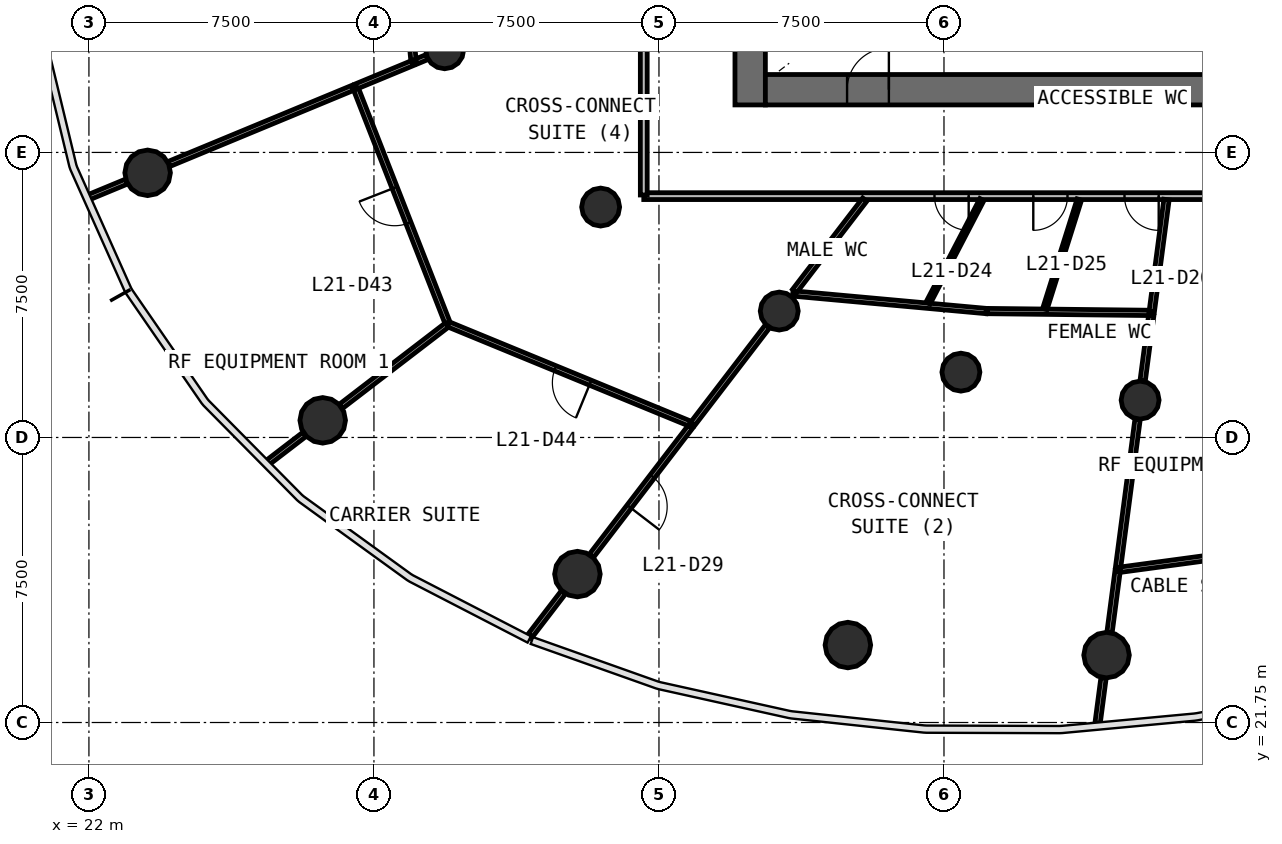
"""IFC4 building model, lengths in metres.
Left out: names, types, materials, properties, quantities, classifications, styles, units other than length and angle.
Written with IfcOpenShell. Run it as: python <this file> out.ifc"""

import sys

from ifc_helpers import new_model, si_unit, direction, frame, frame_2d, origin, origin_2d, place, context, subcontext, project, spatial, rectangle, circle, extrude, source, transform, mapped, element, fill, save


model = new_model("IFC4")
c1 = context("Model", 3, precision=1e-05, world=origin(), true_north=direction((0.0, 1.0)))
c2 = subcontext(c1, "Body", "Model", "MODEL_VIEW")
j1 = project(units=[si_unit("LENGTHUNIT", "METRE"), si_unit("PLANEANGLEUNIT", "RADIAN")], contexts=[c1])
p1 = place(None, origin())
s1 = spatial("IfcSite", under=j1, at=p1, CompositionType="ELEMENT")
p2 = place(p1, origin())
s2 = spatial("IfcBuilding", under=s1, at=p2, CompositionType="ELEMENT")
p3 = place(p2, frame((0.0, 0.0, 92.1)))
s3 = spatial("IfcBuildingStorey", under=s2, at=p3, CompositionType="ELEMENT", Elevation=92.1)
p4 = place(p3, frame((39.4, 58.0, 0.0), z_axis=(0.0, 0.0, 1.0), x_axis=(0.0, -1.0, 0.0)))
e1 = element("IfcWall", 1, at=p4, inside=s3, PredefinedType="SHEAR", context=c2, shape_type="SweptSolid", body=[
    extrude(rectangle(XDim=20.0, YDim=0.8, at=frame_2d((10.0, 0.0))), origin(), (0.0, 0.0, 1.0), 4.1),
])
p5 = place(p4, frame((9.1, 0.0, 0.0)))
e2 = element("IfcOpeningElement", 2, at=p5, cuts=e1, PredefinedType="OPENING", context=c2, shape_type="SweptSolid", body=[
    extrude(rectangle(XDim=1.8, YDim=2.1, at=frame_2d((0.9, 1.05))), frame((0.0, 0.41, 0.0), z_axis=(0.0, -1.0, 0.0), x_axis=(1.0, 0.0, 0.0)), (0.0, 0.0, 1.0), 0.82),
])
p6 = place(p3, frame((39.8, 38.4, 0.0), z_axis=(0.0, 0.0, 1.0), x_axis=(1.0, 0.0, 0.0)))
e3 = element("IfcWall", 3, at=p6, inside=s3, PredefinedType="SHEAR", context=c2, shape_type="SweptSolid", body=[
    extrude(rectangle(XDim=24.4, YDim=0.8, at=frame_2d((12.2, 0.0))), origin(), (0.0, 0.0, 1.0), 4.1),
])
p7 = place(p6, frame((21.65, 0.0, 0.0)))
e4 = element("IfcOpeningElement", 4, at=p7, cuts=e3, PredefinedType="OPENING", context=c2, shape_type="SweptSolid", body=[
    extrude(rectangle(XDim=1.1, YDim=2.1, at=frame_2d((0.55, 1.05))), frame((0.0, 0.41, 0.0), z_axis=(0.0, -1.0, 0.0), x_axis=(1.0, 0.0, 0.0)), (0.0, 0.0, 1.0), 0.82),
])
p8 = place(p6, frame((2.15, 0.0, 0.0)))
e5 = element("IfcOpeningElement", 5, at=p8, cuts=e3, PredefinedType="OPENING", context=c2, shape_type="SweptSolid", body=[
    extrude(rectangle(XDim=1.1, YDim=2.1, at=frame_2d((0.55, 1.05))), frame((0.0, 0.41, 0.0), z_axis=(0.0, -1.0, 0.0), x_axis=(1.0, 0.0, 0.0)), (0.0, 0.0, 1.0), 0.82),
])
m1 = source(origin(), c2, "Body", "SweptSolid", [
    extrude(circle(Radius=0.6, at=origin_2d()), origin(), (0.0, 0.0, 1.0), 4.1),
])
for number, where, z_axis, x_axis in (
    (6, (23.544, 36.213, 0.0), (0.0, 0.0, 1.0), (1.0, 0.0, 0.0)),
    (7, (28.152, 29.701, 0.0), (0.0, 0.0, 1.0), (1.0, 0.0, 0.0)),
    (8, (34.854, 25.655, 0.0), (0.0, 0.0, 1.0), (1.0, 0.0, 0.0)),
    (9, (41.971, 23.788, 0.0), (0.0, 0.0, 1.0), (1.0, 0.0, 0.0)),
    (10, (48.778, 23.523, 0.0), (0.0, 0.0, 1.0), (1.0, 0.0, 0.0)),
):
    element("IfcColumn", number, at=place(p3, frame(where, z_axis=z_axis, x_axis=x_axis)), inside=s3, PredefinedType="COLUMN", context=c2, shape_type="MappedRepresentation", body=[
        mapped(m1, transform((0.0, 0.0, 0.0), scale=1.0)),
    ])
m2 = source(origin(), c2, "Body", "SweptSolid", [
    extrude(circle(Radius=0.5, at=origin_2d()), origin(), (0.0, 0.0, 1.0), 4.1),
])
for number, where, z_axis, x_axis in (
    (11, (31.361, 39.451, 0.0), (0.0, 0.0, 1.0), (1.0, 0.0, 0.0)),
    (12, (35.465, 35.312, 0.0), (0.0, 0.0, 1.0), (1.0, 0.0, 0.0)),
    (13, (40.165, 32.576, 0.0), (0.0, 0.0, 1.0), (1.0, 0.0, 0.0)),
    (14, (44.945, 30.969, 0.0), (0.0, 0.0, 1.0), (1.0, 0.0, 0.0)),
    (15, (49.661, 30.233, 0.0), (0.0, 0.0, 1.0), (1.0, 0.0, 0.0)),
):
    element("IfcColumn", number, at=place(p3, frame(where, z_axis=z_axis, x_axis=x_axis)), inside=s3, PredefinedType="COLUMN", context=c2, shape_type="MappedRepresentation", body=[
        mapped(m2, transform((0.0, 0.0, 0.0), scale=1.0)),
    ])
p9 = place(p3, frame((67.4, 35.6, 0.0), z_axis=(0.0, 0.0, 1.0), x_axis=(-1.0, 0.0, 0.0)))
e16 = element("IfcWall", 16, at=p9, inside=s3, PredefinedType="PARTITIONING", context=c2, shape_type="SweptSolid", body=[
    extrude(rectangle(XDim=30.8, YDim=0.18, at=frame_2d((15.4, 0.0))), origin(), (0.0, 0.0, 1.0), 2.9),
])
p10 = place(p9, frame((22.25, 0.0, 0.0)))
e17 = element("IfcOpeningElement", 17, at=p10, cuts=e16, PredefinedType="OPENING", context=c2, shape_type="SweptSolid", body=[
    extrude(rectangle(XDim=0.9, YDim=2.1, at=frame_2d((0.45, 1.05))), frame((0.0, 0.1, 0.0), z_axis=(0.0, -1.0, 0.0), x_axis=(1.0, 0.0, 0.0)), (0.0, 0.0, 1.0), 0.2),
])
p11 = place(p9, frame((19.65, 0.0, 0.0)))
e18 = element("IfcOpeningElement", 18, at=p11, cuts=e16, PredefinedType="OPENING", context=c2, shape_type="SweptSolid", body=[
    extrude(rectangle(XDim=0.9, YDim=2.1, at=frame_2d((0.45, 1.05))), frame((0.0, 0.1, 0.0), z_axis=(0.0, -1.0, 0.0), x_axis=(1.0, 0.0, 0.0)), (0.0, 0.0, 1.0), 0.2),
])
p12 = place(p9, frame((17.25, 0.0, 0.0)))
e19 = element("IfcOpeningElement", 19, at=p12, cuts=e16, PredefinedType="OPENING", context=c2, shape_type="SweptSolid", body=[
    extrude(rectangle(XDim=0.9, YDim=2.1, at=frame_2d((0.45, 1.05))), frame((0.0, 0.1, 0.0), z_axis=(0.0, -1.0, 0.0), x_axis=(1.0, 0.0, 0.0)), (0.0, 0.0, 1.0), 0.2),
])
p13 = place(p9, frame((14.95, 0.0, 0.0)))
e20 = element("IfcOpeningElement", 20, at=p13, cuts=e16, PredefinedType="OPENING", context=c2, shape_type="SweptSolid", body=[
    extrude(rectangle(XDim=1.0, YDim=2.1, at=frame_2d((0.5, 1.05))), frame((0.0, 0.1, 0.0), z_axis=(0.0, -1.0, 0.0), x_axis=(1.0, 0.0, 0.0)), (0.0, 0.0, 1.0), 0.2),
])
p14 = place(p9, frame((4.35, 0.0, 0.0)))
e21 = element("IfcOpeningElement", 21, at=p14, cuts=e16, PredefinedType="OPENING", context=c2, shape_type="SweptSolid", body=[
    extrude(rectangle(XDim=1.0, YDim=2.1, at=frame_2d((0.5, 1.05))), frame((0.0, 0.1, 0.0), z_axis=(0.0, -1.0, 0.0), x_axis=(1.0, 0.0, 0.0)), (0.0, 0.0, 1.0), 0.2),
])
p15 = place(p3, frame((36.6, 35.63, 0.0), z_axis=(0.0, 0.0, 1.0), x_axis=(0.0, 1.0, 0.0)))
e22 = element("IfcWall", 22, at=p15, inside=s3, PredefinedType="PARTITIONING", context=c2, shape_type="SweptSolid", body=[
    extrude(rectangle(XDim=23.583, YDim=0.18, at=frame_2d((11.791, 0.0))), origin(), (0.0, 0.0, 1.0), 2.9),
])
p16 = place(p15, frame((11.333, 0.0, 0.0)))
e23 = element("IfcOpeningElement", 23, at=p16, cuts=e22, PredefinedType="OPENING", context=c2, shape_type="SweptSolid", body=[
    extrude(rectangle(XDim=1.0, YDim=2.1, at=frame_2d((0.5, 1.05))), frame((0.0, 0.1, 0.0), z_axis=(0.0, -1.0, 0.0), x_axis=(1.0, 0.0, 0.0)), (0.0, 0.0, 1.0), 0.2),
])
p17 = place(p15, frame((4.532, 0.0, 0.0)))
e24 = element("IfcOpeningElement", 24, at=p17, cuts=e22, PredefinedType="OPENING", context=c2, shape_type="SweptSolid", body=[
    extrude(rectangle(XDim=1.0, YDim=2.1, at=frame_2d((0.5, 1.05))), frame((0.0, 0.1, 0.0), z_axis=(0.0, -1.0, 0.0), x_axis=(1.0, 0.0, 0.0)), (0.0, 0.0, 1.0), 0.2),
])
p18 = place(p3, frame((37.873, 29.59, 0.0), z_axis=(0.0, 0.0, 1.0), x_axis=(-0.92486289716, 0.380300698733, 0.0)))
e25 = element("IfcWall", 25, at=p18, inside=s3, PredefinedType="PARTITIONING", context=c2, shape_type="SweptSolid", body=[
    extrude(rectangle(XDim=6.946, YDim=0.14, at=frame_2d((3.473, 0.0))), origin(), (0.0, 0.0, 1.0), 2.9),
])
p19 = place(p18, frame((2.896, 0.0, 0.0)))
e26 = element("IfcOpeningElement", 26, at=p19, cuts=e25, PredefinedType="OPENING", context=c2, shape_type="SweptSolid", body=[
    extrude(rectangle(XDim=1.0, YDim=2.1, at=frame_2d((0.5, 1.05))), frame((0.0, 0.08, 0.0), z_axis=(0.0, -1.0, 0.0), x_axis=(1.0, 0.0, 0.0)), (0.0, 0.0, 1.0), 0.16),
])
p20 = place(p3, frame((31.439, 32.259, 0.0), z_axis=(0.0, 0.0, 1.0), x_axis=(-0.364570341209, 0.931175851443, 0.0)))
e27 = element("IfcWall", 27, at=p20, inside=s3, PredefinedType="PARTITIONING", context=c2, shape_type="SweptSolid", body=[
    extrude(rectangle(XDim=6.675, YDim=0.14, at=frame_2d((3.338, 0.0))), origin(), (0.0, 0.0, 1.0), 2.9),
])
p21 = place(p20, frame((2.825, 0.0, 0.0)))
e28 = element("IfcOpeningElement", 28, at=p21, cuts=e27, PredefinedType="OPENING", context=c2, shape_type="SweptSolid", body=[
    extrude(rectangle(XDim=1.0, YDim=2.1, at=frame_2d((0.5, 1.05))), frame((0.0, 0.08, 0.0), z_axis=(0.0, -1.0, 0.0), x_axis=(1.0, 0.0, 0.0)), (0.0, 0.0, 1.0), 0.16),
])
p22 = place(p3, frame((29.993, 45.103, 0.0), z_axis=(0.0, 0.0, 1.0), x_axis=(0.091688453154, -0.995787742221, 0.0)))
e29 = element("IfcWall", 29, at=p22, inside=s3, PredefinedType="PARTITIONING", context=c2, shape_type="SweptSolid", body=[
    extrude(rectangle(XDim=6.015, YDim=0.14, at=frame_2d((3.008, 0.0))), origin(), (0.0, 0.0, 1.0), 2.9),
])
p23 = place(p3, frame((49.072, 25.761, 0.0), z_axis=(0.0, 0.0, 1.0), x_axis=(0.991000573884, 0.133857620483, 0.0)))
e30 = element("IfcWall", 30, at=p23, inside=s3, PredefinedType="PARTITIONING", context=c2, shape_type="SweptSolid", body=[
    extrude(rectangle(XDim=5.805, YDim=0.14, at=frame_2d((2.903, 0.0))), origin(), (0.0, 0.0, 1.0), 2.9),
])
p24 = place(p3, frame((28.94, 38.448, 0.0), z_axis=(0.0, 0.0, 1.0), x_axis=(-0.923869625223, -0.382707349798, 0.0)))
e31 = element("IfcWall", 31, at=p24, inside=s3, PredefinedType="PARTITIONING", context=c2, shape_type="SweptSolid", body=[
    extrude(rectangle(XDim=5.236, YDim=0.14, at=frame_2d((2.618, 0.0))), origin(), (0.0, 0.0, 1.0), 2.9),
])
p25 = place(p3, frame((40.52, 33.039, 0.0), z_axis=(0.0, 0.0, 1.0), x_axis=(0.995896728673, -0.090496993423, 0.0)))
e32 = element("IfcWall", 32, at=p25, inside=s3, PredefinedType="PARTITIONING", context=c2, shape_type="SweptSolid", body=[
    extrude(rectangle(XDim=5.112, YDim=0.14, at=frame_2d((2.556, 0.0))), origin(), (0.0, 0.0, 1.0), 2.9),
])
p26 = place(p3, frame((37.829, 29.532, 0.0), z_axis=(0.0, 0.0, 1.0), x_axis=(-0.608729505252, -0.793377835231, 0.0)))
e33 = element("IfcWall", 33, at=p26, inside=s3, PredefinedType="PARTITIONING", context=c2, shape_type="SweptSolid", body=[
    extrude(rectangle(XDim=4.282, YDim=0.14, at=frame_2d((2.141, 0.0))), origin(), (0.0, 0.0, 1.0), 2.9),
])
p27 = place(p26, frame((1.65, 0.0, 0.0)))
e34 = element("IfcOpeningElement", 34, at=p27, cuts=e33, PredefinedType="OPENING", context=c2, shape_type="SweptSolid", body=[
    extrude(rectangle(XDim=1.0, YDim=2.1, at=frame_2d((0.5, 1.05))), frame((0.0, 0.08, 0.0), z_axis=(0.0, -1.0, 0.0), x_axis=(1.0, 0.0, 0.0)), (0.0, 0.0, 1.0), 0.16),
])
p28 = place(p3, frame((45.641, 32.576, 0.0), z_axis=(0.0, 0.0, 1.0), x_axis=(0.999935534921, -0.011354558642, 0.0)))
e35 = element("IfcWall", 35, at=p28, inside=s3, PredefinedType="PARTITIONING", context=c2, shape_type="SweptSolid", body=[
    extrude(rectangle(XDim=4.322, YDim=0.14, at=frame_2d((2.161, 0.0))), origin(), (0.0, 0.0, 1.0), 2.9),
])
p29 = place(p3, frame((49.595, 29.733, 0.0), z_axis=(0.0, 0.0, 1.0), x_axis=(-0.130480204278, -0.991450914716, 0.0)))
e36 = element("IfcWall", 36, at=p29, inside=s3, PredefinedType="PARTITIONING", context=c2, shape_type="SweptSolid", body=[
    extrude(rectangle(XDim=3.933, YDim=0.14, at=frame_2d((1.967, 0.0))), origin(), (0.0, 0.0, 1.0), 2.9),
])
p30 = place(p3, frame((31.426, 32.213, 0.0), z_axis=(0.0, 0.0, 1.0), x_axis=(-0.793398837897, -0.608702130787, 0.0)))
e37 = element("IfcWall", 37, at=p30, inside=s3, PredefinedType="PARTITIONING", context=c2, shape_type="SweptSolid", body=[
    extrude(rectangle(XDim=3.523, YDim=0.14, at=frame_2d((1.761, 0.0))), origin(), (0.0, 0.0, 1.0), 2.9),
])
p31 = place(p3, frame((39.858, 32.176, 0.0), z_axis=(0.0, 0.0, 1.0), x_axis=(-0.608767895977, -0.79334837797, 0.0)))
e38 = element("IfcWall", 38, at=p31, inside=s3, PredefinedType="PARTITIONING", context=c2, shape_type="SweptSolid", body=[
    extrude(rectangle(XDim=3.23, YDim=0.14, at=frame_2d((1.615, 0.0))), origin(), (0.0, 0.0, 1.0), 2.9),
])
p32 = place(p3, frame((42.416, 35.51, 0.0), z_axis=(0.0, 0.0, 1.0), x_axis=(-0.608725669938, -0.793380777911, 0.0)))
e39 = element("IfcWall", 39, at=p32, inside=s3, PredefinedType="PARTITIONING", context=c2, shape_type="SweptSolid", body=[
    extrude(rectangle(XDim=3.032, YDim=0.14, at=frame_2d((1.516, 0.0))), origin(), (0.0, 0.0, 1.0), 2.9),
])
p33 = place(p3, frame((50.356, 35.51, 0.0), z_axis=(0.0, 0.0, 1.0), x_axis=(-0.13056900495, -0.991439224031, 0.0)))
e40 = element("IfcWall", 40, at=p33, inside=s3, PredefinedType="PARTITIONING", context=c2, shape_type="SweptSolid", body=[
    extrude(rectangle(XDim=2.979, YDim=0.14, at=frame_2d((1.489, 0.0))), origin(), (0.0, 0.0, 1.0), 2.9),
])
p34 = place(p3, frame((49.954, 32.457, 0.0), z_axis=(0.0, 0.0, 1.0), x_axis=(-0.130545289911, -0.991442346928, 0.0)))
e41 = element("IfcWall", 41, at=p34, inside=s3, PredefinedType="PARTITIONING", context=c2, shape_type="SweptSolid", body=[
    extrude(rectangle(XDim=1.739, YDim=0.14, at=frame_2d((0.87, 0.0))), origin(), (0.0, 0.0, 1.0), 2.9),
])
p35 = place(p3, frame((30.517, 39.102, 0.0), z_axis=(0.0, 0.0, 1.0), x_axis=(-0.923924255361, -0.382575444006, 0.0)))
e42 = element("IfcWall", 42, at=p35, inside=s3, PredefinedType="PARTITIONING", context=c2, shape_type="SweptSolid", body=[
    extrude(rectangle(XDim=1.607, YDim=0.14, at=frame_2d((0.803, 0.0))), origin(), (0.0, 0.0, 1.0), 2.9),
])
p36 = place(p3, frame((49.068, 25.732, 0.0), z_axis=(0.0, 0.0, 1.0), x_axis=(-0.13054788539, -0.991442005172, 0.0)))
e43 = element("IfcWall", 43, at=p36, inside=s3, PredefinedType="PARTITIONING", context=c2, shape_type="SweptSolid", body=[
    extrude(rectangle(XDim=1.623, YDim=0.14, at=frame_2d((0.812, 0.0))), origin(), (0.0, 0.0, 1.0), 2.9),
])
p37 = place(p3, frame((34.486, 25.176, 0.0), z_axis=(0.0, 0.0, 1.0), x_axis=(-0.608818785139, -0.79330932609, 0.0)))
e44 = element("IfcWall", 44, at=p37, inside=s3, PredefinedType="PARTITIONING", context=c2, shape_type="SweptSolid", body=[
    extrude(rectangle(XDim=1.429, YDim=0.14, at=frame_2d((0.715, 0.0))), origin(), (0.0, 0.0, 1.0), 2.9),
])
p38 = place(p3, frame((27.672, 29.333, 0.0), z_axis=(0.0, 0.0, 1.0), x_axis=(-0.7932870498, -0.608847810721, 0.0)))
e45 = element("IfcWall", 45, at=p38, inside=s3, PredefinedType="PARTITIONING", context=c2, shape_type="SweptSolid", body=[
    extrude(rectangle(XDim=1.231, YDim=0.14, at=frame_2d((0.615, 0.0))), origin(), (0.0, 0.0, 1.0), 2.9),
])
p39 = place(p3, frame((48.699, 22.924, 0.0), z_axis=(0.0, 0.0, 1.0), x_axis=(-0.130475508699, -0.991451532668, 0.0)))
e46 = element("IfcWall", 46, at=p39, inside=s3, PredefinedType="PARTITIONING", context=c2, shape_type="SweptSolid", body=[
    extrude(rectangle(XDim=1.203, YDim=0.14, at=frame_2d((0.602, 0.0))), origin(), (0.0, 0.0, 1.0), 2.9),
])
p40 = place(p3, frame((22.986, 35.982, 0.0), z_axis=(0.0, 0.0, 1.0), x_axis=(-0.923936411435, -0.382546085621, 0.0)))
e47 = element("IfcWall", 47, at=p40, inside=s3, PredefinedType="PARTITIONING", context=c2, shape_type="SweptSolid", body=[
    extrude(rectangle(XDim=1.073, YDim=0.14, at=frame_2d((0.536, 0.0))), origin(), (0.0, 0.0, 1.0), 2.9),
])
p41 = place(p3, frame((30.894, 39.258, 0.0), z_axis=(0.0, 0.0, 1.0), x_axis=(-0.923645219799, -0.383248624188, 0.0)))
e48 = element("IfcWall", 48, at=p41, inside=s3, PredefinedType="PARTITIONING", context=c2, shape_type="SweptSolid", body=[
    extrude(rectangle(XDim=0.304, YDim=0.14, at=frame_2d((0.152, 0.0))), origin(), (0.0, 0.0, 1.0), 2.9),
])
p42 = place(p3, frame((45.498, 35.51, 0.0), z_axis=(0.0, 0.0, 1.0), x_axis=(-0.461718143069, -0.887026694278, 0.0)))
e49 = element("IfcWall", 49, at=p42, inside=s3, PredefinedType="PARTITIONING", context=c2, shape_type="SweptSolid", body=[
    extrude(rectangle(XDim=3.071, YDim=0.12, at=frame_2d((1.536, 0.0))), origin(), (0.0, 0.0, 1.0), 2.9),
])
p43 = place(p3, frame((48.062, 35.51, 0.0), z_axis=(0.0, 0.0, 1.0), x_axis=(-0.30071748679, -0.953713265683, 0.0)))
e50 = element("IfcWall", 50, at=p43, inside=s3, PredefinedType="PARTITIONING", context=c2, shape_type="SweptSolid", body=[
    extrude(rectangle(XDim=3.021, YDim=0.12, at=frame_2d((1.51, 0.0))), origin(), (0.0, 0.0, 1.0), 2.9),
])
m3 = source(origin(), c2, "Body", "SweptSolid", [
    extrude(rectangle(XDim=1.1, YDim=2.1, at=frame_2d((0.55, 1.05))), frame((0.0, 0.025, 0.0), z_axis=(0.0, -1.0, 0.0), x_axis=(1.0, 0.0, 0.0)), (0.0, 0.0, 1.0), 0.05),
])
p44 = place(p8, origin())
e51 = element("IfcDoor", 51, at=p44, inside=s3, OperationType="SINGLE_SWING_RIGHT", PredefinedType="DOOR", context=c2, shape_type="MappedRepresentation", body=[
    mapped(m3, transform((0.0, 0.0, 0.0), scale=1.0)),
])
fill(e5, e51)
m4 = source(origin(), c2, "Body", "SweptSolid", [
    extrude(rectangle(XDim=0.9, YDim=2.1, at=frame_2d((0.45, 1.05))), frame((0.0, 0.025, 0.0), z_axis=(0.0, -1.0, 0.0), x_axis=(1.0, 0.0, 0.0)), (0.0, 0.0, 1.0), 0.05),
])
p45 = place(p10, origin())
e52 = element("IfcDoor", 52, at=p45, inside=s3, OperationType="SINGLE_SWING_LEFT", PredefinedType="DOOR", context=c2, shape_type="MappedRepresentation", body=[
    mapped(m4, transform((0.0, 0.0, 0.0), scale=1.0)),
])
fill(e17, e52)
p46 = place(p11, origin())
e53 = element("IfcDoor", 53, at=p46, inside=s3, OperationType="SINGLE_SWING_RIGHT", PredefinedType="DOOR", context=c2, shape_type="MappedRepresentation", body=[
    mapped(m4, transform((0.0, 0.0, 0.0), scale=1.0)),
])
fill(e18, e53)
p47 = place(p12, origin())
e54 = element("IfcDoor", 54, at=p47, inside=s3, OperationType="SINGLE_SWING_LEFT", PredefinedType="DOOR", context=c2, shape_type="MappedRepresentation", body=[
    mapped(m4, transform((0.0, 0.0, 0.0), scale=1.0)),
])
fill(e19, e54)
m5 = source(origin(), c2, "Body", "SweptSolid", [
    extrude(rectangle(XDim=1.0, YDim=2.1, at=frame_2d((0.5, 1.05))), frame((0.0, 0.025, 0.0), z_axis=(0.0, -1.0, 0.0), x_axis=(1.0, 0.0, 0.0)), (0.0, 0.0, 1.0), 0.05),
])
p48 = place(p27, origin())
e55 = element("IfcDoor", 55, at=p48, inside=s3, OperationType="SINGLE_SWING_RIGHT", PredefinedType="DOOR", context=c2, shape_type="MappedRepresentation", body=[
    mapped(m5, transform((0.0, 0.0, 0.0), scale=1.0)),
])
fill(e34, e55)
p49 = place(p21, origin())
e56 = element("IfcDoor", 56, at=p49, inside=s3, OperationType="SINGLE_SWING_RIGHT", PredefinedType="DOOR", context=c2, shape_type="MappedRepresentation", body=[
    mapped(m5, transform((0.0, 0.0, 0.0), scale=1.0)),
])
fill(e28, e56)
p50 = place(p19, origin())
e57 = element("IfcDoor", 57, at=p50, inside=s3, OperationType="SINGLE_SWING_LEFT", PredefinedType="DOOR", context=c2, shape_type="MappedRepresentation", body=[
    mapped(m5, transform((0.0, 0.0, 0.0), scale=1.0)),
])
fill(e26, e57)
save(model, sys.argv[1])
